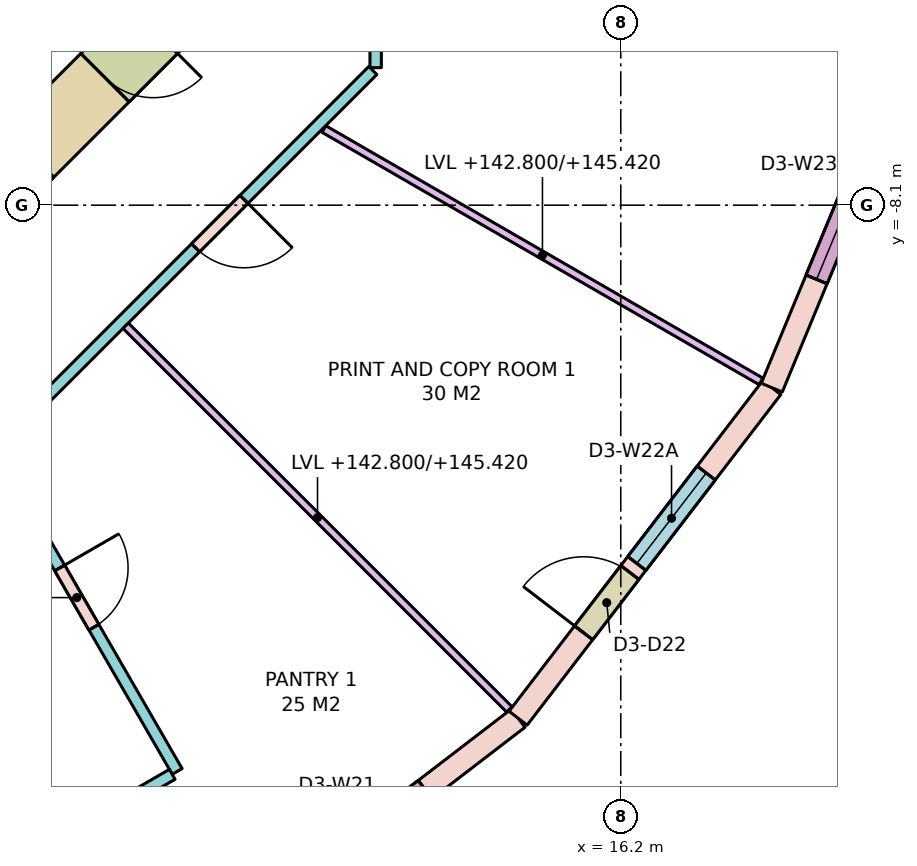
"""IFC4 building model, lengths in metres.
Left out: names, types, materials, properties, quantities, classifications, styles, units other than length and angle.
Written with IfcOpenShell. Run it as: python <this file> out.ifc"""

import sys

from ifc_helpers import new_model, si_unit, direction, frame, frame_2d, origin, place, context, subcontext, project, spatial, rectangle, extrude, element, fill, save


model = new_model("IFC4")
c1 = context("Model", 3, precision=1e-05, world=origin(), true_north=direction((0.0, 1.0)))
c2 = subcontext(c1, "Body", "Model", "MODEL_VIEW")
j1 = project(units=[si_unit("LENGTHUNIT", "METRE"), si_unit("PLANEANGLEUNIT", "RADIAN")], contexts=[c1])
p1 = place(None, origin())
s1 = spatial("IfcSite", under=j1, at=p1, CompositionType="ELEMENT")
p2 = place(p1, origin())
s2 = spatial("IfcBuilding", under=s1, at=p2, CompositionType="ELEMENT")
p3 = place(p2, frame((0.0, 0.0, 142.8)))
s3 = spatial("IfcBuildingStorey", under=s2, at=p3, CompositionType="ELEMENT", Elevation=142.8)
p4 = place(p3, frame((10.418, -5.418, -0.28), z_axis=(0.0, 0.0, 1.0), x_axis=(-0.707106781187, -0.707106781187, 0.0)))
e1 = element("IfcWall", 1, at=p4, inside=s3, PredefinedType="SHEAR", context=c2, shape_type="SweptSolid", body=[
    extrude(rectangle(XDim=4.243, YDim=0.9, at=frame_2d((2.121, 0.0))), origin(), (0.0, 0.0, 1.0), 3.8),
])
p5 = place(p4, frame((2.823, 0.0, 0.28)))
e2 = element("IfcOpeningElement", 2, at=p5, cuts=e1, PredefinedType="OPENING", context=c2, shape_type="SweptSolid", body=[
    extrude(rectangle(XDim=0.9, YDim=2.1, at=frame_2d((0.45, 1.05))), frame((0.0, 0.46, 0.0), z_axis=(0.0, -1.0, 0.0), x_axis=(1.0, 0.0, 0.0)), (0.0, 0.0, 1.0), 0.92),
])
p6 = place(p4, frame((0.52, 0.0, 0.28)))
e3 = element("IfcOpeningElement", 3, at=p6, cuts=e1, PredefinedType="OPENING", context=c2, shape_type="SweptSolid", body=[
    extrude(rectangle(XDim=0.9, YDim=2.1, at=frame_2d((0.45, 1.05))), frame((0.0, 0.46, 0.0), z_axis=(0.0, -1.0, 0.0), x_axis=(1.0, 0.0, 0.0)), (0.0, 0.0, 1.0), 0.92),
])
p7 = place(p3, frame((10.5, -18.187, 0.0), z_axis=(0.0, 0.0, 1.0), x_axis=(0.793335336593, 0.608784891166, 0.0)))
e4 = element("IfcWall", 4, at=p7, inside=s3, PredefinedType="STANDARD", context=c2, shape_type="SweptSolid", body=[
    extrude(rectangle(XDim=5.482, YDim=0.3, at=frame_2d((2.741, 0.0))), origin(), (0.0, 0.0, 1.0), 3.52),
])
p8 = place(p7, frame((1.541, 0.0, 0.8)))
e5 = element("IfcOpeningElement", 5, at=p8, cuts=e4, PredefinedType="OPENING", context=c2, shape_type="SweptSolid", body=[
    extrude(rectangle(XDim=2.4, YDim=2.5, at=frame_2d((1.2, 1.25))), frame((0.0, 0.16, 0.0), z_axis=(0.0, -1.0, 0.0), x_axis=(1.0, 0.0, 0.0)), (0.0, 0.0, 1.0), 0.32),
])
p9 = place(p3, frame((14.849, -14.849, 0.0), z_axis=(0.0, 0.0, 1.0), x_axis=(0.608784891166, 0.793335336593, 0.0)))
e6 = element("IfcWall", 6, at=p9, inside=s3, PredefinedType="STANDARD", context=c2, shape_type="SweptSolid", body=[
    extrude(rectangle(XDim=5.482, YDim=0.3, at=frame_2d((2.741, 0.0))), origin(), (0.0, 0.0, 1.0), 3.52),
])
p10 = place(p9, frame((1.416, 0.0, 0.0)))
e7 = element("IfcOpeningElement", 7, at=p10, cuts=e6, PredefinedType="OPENING", context=c2, shape_type="SweptSolid", body=[
    extrude(rectangle(XDim=1.0, YDim=2.4, at=frame_2d((0.5, 1.2))), frame((0.0, 0.16, 0.0), z_axis=(0.0, -1.0, 0.0), x_axis=(1.0, 0.0, 0.0)), (0.0, 0.0, 1.0), 0.32),
])
p11 = place(p9, frame((2.566, 0.0, 0.8)))
e8 = element("IfcOpeningElement", 8, at=p11, cuts=e6, PredefinedType="OPENING", context=c2, shape_type="SweptSolid", body=[
    extrude(rectangle(XDim=1.5, YDim=2.5, at=frame_2d((0.75, 1.25))), frame((0.0, 0.16, 0.0), z_axis=(0.0, -1.0, 0.0), x_axis=(1.0, 0.0, 0.0)), (0.0, 0.0, 1.0), 0.32),
])
p12 = place(p3, frame((18.187, -10.5, 0.0), z_axis=(0.0, 0.0, 1.0), x_axis=(0.382688740813, 0.923877333662, 0.0)))
e9 = element("IfcWall", 9, at=p12, inside=s3, PredefinedType="STANDARD", context=c2, shape_type="SweptSolid", body=[
    extrude(rectangle(XDim=5.482, YDim=0.3, at=frame_2d((2.741, 0.0))), origin(), (0.0, 0.0, 1.0), 3.52),
])
p13 = place(p12, frame((1.541, 0.0, 0.8)))
e10 = element("IfcOpeningElement", 10, at=p13, cuts=e9, PredefinedType="OPENING", context=c2, shape_type="SweptSolid", body=[
    extrude(rectangle(XDim=2.4, YDim=2.5, at=frame_2d((1.2, 1.25))), frame((0.0, 0.16, 0.0), z_axis=(0.0, -1.0, 0.0), x_axis=(1.0, 0.0, 0.0)), (0.0, 0.0, 1.0), 0.32),
])
p14 = place(p3, frame((12.975, 6.105, 0.0), z_axis=(0.0, 0.0, 1.0), x_axis=(0.0, -1.0, 0.0)))
e11 = element("IfcWall", 11, at=p14, inside=s3, PredefinedType="PARTITIONING", context=c2, shape_type="SweptSolid", body=[
    extrude(rectangle(XDim=12.396, YDim=0.15, at=frame_2d((6.198, 0.0))), origin(), (0.0, 0.0, 1.0), 2.62),
])
p15 = place(p14, frame((5.298, 0.0, 0.0)))
e12 = element("IfcOpeningElement", 12, at=p15, cuts=e11, PredefinedType="OPENING", context=c2, shape_type="SweptSolid", body=[
    extrude(rectangle(XDim=1.8, YDim=2.1, at=frame_2d((0.9, 1.05))), frame((0.0, 0.085, 0.0), z_axis=(0.0, -1.0, 0.0), x_axis=(1.0, 0.0, 0.0)), (0.0, 0.0, 1.0), 0.17),
])
p16 = place(p3, frame((12.938, -6.328, 0.0), z_axis=(0.0, 0.0, 1.0), x_axis=(-0.707088206597, -0.707125355289, 0.0)))
e13 = element("IfcWall", 13, at=p16, inside=s3, PredefinedType="PARTITIONING", context=c2, shape_type="SweptSolid", body=[
    extrude(rectangle(XDim=6.572, YDim=0.15, at=frame_2d((3.286, 0.0))), origin(), (0.0, 0.0, 1.0), 2.62),
])
p17 = place(p16, frame((2.398, 0.0, 0.0)))
e14 = element("IfcOpeningElement", 14, at=p17, cuts=e13, PredefinedType="OPENING", context=c2, shape_type="SweptSolid", body=[
    extrude(rectangle(XDim=0.9, YDim=2.1, at=frame_2d((0.45, 1.05))), frame((0.0, 0.085, 0.0), z_axis=(0.0, -1.0, 0.0), x_axis=(1.0, 0.0, 0.0)), (0.0, 0.0, 1.0), 0.17),
])
p18 = place(p3, frame((7.722, -10.975, 0.0), z_axis=(0.0, 0.0, 1.0), x_axis=(0.499981143329, -0.866036290415, 0.0)))
e15 = element("IfcWall", 15, at=p18, inside=s3, PredefinedType="PARTITIONING", context=c2, shape_type="SweptSolid", body=[
    extrude(rectangle(XDim=5.283, YDim=0.15, at=frame_2d((2.642, 0.0))), origin(), (0.0, 0.0, 1.0), 3.52),
])
p19 = place(p18, frame((2.191, 0.0, 0.0)))
e16 = element("IfcOpeningElement", 16, at=p19, cuts=e15, PredefinedType="OPENING", context=c2, shape_type="SweptSolid", body=[
    extrude(rectangle(XDim=0.9, YDim=2.1, at=frame_2d((0.45, 1.05))), frame((0.0, 0.085, 0.0), z_axis=(0.0, -1.0, 0.0), x_axis=(1.0, 0.0, 0.0)), (0.0, 0.0, 1.0), 0.17),
])
p20 = place(p3, frame((10.299, -15.588, 0.0), z_axis=(0.0, 0.0, 1.0), x_axis=(-0.866017533419, -0.500013631625, 0.0)))
e17 = element("IfcWall", 17, at=p20, inside=s3, PredefinedType="PARTITIONING", context=c2, shape_type="SweptSolid", body=[
    extrude(rectangle(XDim=2.25, YDim=0.15, at=frame_2d((1.125, 0.0))), origin(), (0.0, 0.0, 1.0), 2.62),
])
p21 = place(p3, frame((9.686, -9.686, 0.0), z_axis=(0.0, 0.0, 1.0), x_axis=(0.707106781187, -0.707106781187, 0.0)))
e18 = element("IfcWall", 18, at=p21, inside=s3, PredefinedType="PARTITIONING", context=c2, shape_type="SweptSolid", body=[
    extrude(rectangle(XDim=7.139, YDim=0.1, at=frame_2d((3.569, 0.0))), origin(), (0.0, 0.0, 1.0), 2.62),
])
p22 = place(p3, frame((12.294, -7.098, 0.0), z_axis=(0.0, 0.0, 1.0), x_axis=(0.866010486135, -0.500025837236, 0.0)))
e19 = element("IfcWall", 19, at=p22, inside=s3, PredefinedType="PARTITIONING", context=c2, shape_type="SweptSolid", body=[
    extrude(rectangle(XDim=6.641, YDim=0.1, at=frame_2d((3.32, 0.0))), origin(), (0.0, 0.0, 1.0), 2.62),
])
p23 = place(p10, origin())
e20 = element("IfcDoor", 20, at=p23, inside=s3, OperationType="SINGLE_SWING_LEFT", PredefinedType="DOOR", context=c2, shape_type="SweptSolid", body=[
    extrude(rectangle(XDim=1.0, YDim=2.4, at=frame_2d((0.5, 1.2))), frame((0.0, 0.025, 0.0), z_axis=(0.0, -1.0, 0.0), x_axis=(1.0, 0.0, 0.0)), (0.0, 0.0, 1.0), 0.05),
])
fill(e7, e20)
p24 = place(p11, origin())
e21 = element("IfcWindow", 21, at=p24, inside=s3, PartitioningType="SINGLE_PANEL", PredefinedType="WINDOW", context=c2, shape_type="SweptSolid", body=[
    extrude(rectangle(XDim=1.5, YDim=2.5, at=frame_2d((0.75, 1.25))), frame((0.0, 0.03, 0.0), z_axis=(0.0, -1.0, 0.0), x_axis=(1.0, 0.0, 0.0)), (0.0, 0.0, 1.0), 0.06),
])
fill(e8, e21)
p25 = place(p13, origin())
e22 = element("IfcWindow", 22, at=p25, inside=s3, PartitioningType="SINGLE_PANEL", PredefinedType="WINDOW", context=c2, shape_type="SweptSolid", body=[
    extrude(rectangle(XDim=2.4, YDim=2.5, at=frame_2d((1.2, 1.25))), frame((0.0, 0.03, 0.0), z_axis=(0.0, -1.0, 0.0), x_axis=(1.0, 0.0, 0.0)), (0.0, 0.0, 1.0), 0.06),
])
fill(e10, e22)
p26 = place(p6, origin())
e23 = element("IfcDoor", 23, at=p26, inside=s3, OperationType="SINGLE_SWING_LEFT", PredefinedType="DOOR", context=c2, shape_type="SweptSolid", body=[
    extrude(rectangle(XDim=0.9, YDim=2.1, at=frame_2d((0.45, 1.05))), frame((0.0, 0.025, 0.0), z_axis=(0.0, -1.0, 0.0), x_axis=(1.0, 0.0, 0.0)), (0.0, 0.0, 1.0), 0.05),
])
fill(e3, e23)
p27 = place(p19, origin())
e24 = element("IfcDoor", 24, at=p27, inside=s3, OperationType="SINGLE_SWING_LEFT", PredefinedType="DOOR", context=c2, shape_type="SweptSolid", body=[
    extrude(rectangle(XDim=0.9, YDim=2.1, at=frame_2d((0.45, 1.05))), frame((0.0, 0.025, 0.0), z_axis=(0.0, -1.0, 0.0), x_axis=(1.0, 0.0, 0.0)), (0.0, 0.0, 1.0), 0.05),
])
fill(e16, e24)
p28 = place(p17, origin())
e25 = element("IfcDoor", 25, at=p28, inside=s3, OperationType="SINGLE_SWING_LEFT", PredefinedType="DOOR", context=c2, shape_type="SweptSolid", body=[
    extrude(rectangle(XDim=0.9, YDim=2.1, at=frame_2d((0.45, 1.05))), frame((0.0, 0.025, 0.0), z_axis=(0.0, -1.0, 0.0), x_axis=(1.0, 0.0, 0.0)), (0.0, 0.0, 1.0), 0.05),
])
fill(e14, e25)
save(model, sys.argv[1])
